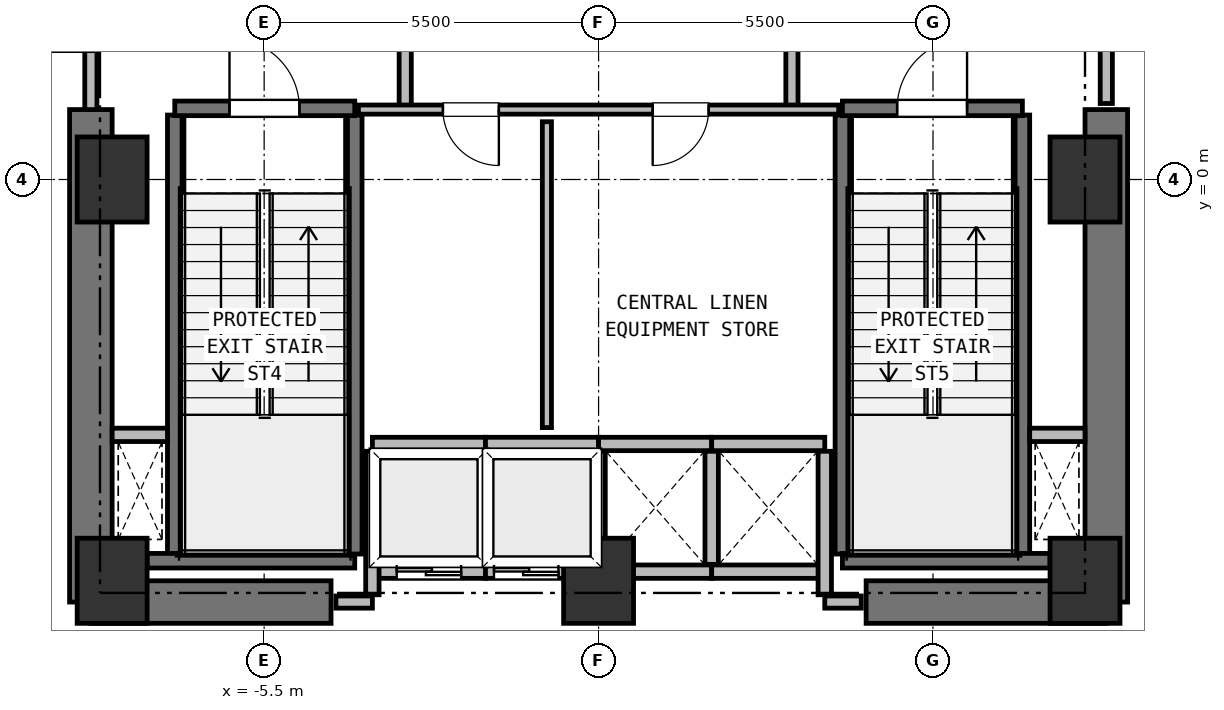
"""IFC4 building model, lengths in metres.
Left out: names, types, materials, properties, quantities, classifications, styles, units other than length and angle.
Written with IfcOpenShell. Run it as: python <this file> out.ifc"""

import sys

from ifc_helpers import new_model, si_unit, direction, frame, frame_2d, origin, origin_2d, place, context, subcontext, project, spatial, rectangle, extrude, element, fill, save


model = new_model("IFC4")
c1 = context("Model", 3, precision=1e-05, world=origin(), true_north=direction((0.0, 1.0)))
c2 = subcontext(c1, "Body", "Model", "MODEL_VIEW")
j1 = project(units=[si_unit("LENGTHUNIT", "METRE"), si_unit("PLANEANGLEUNIT", "RADIAN")], contexts=[c1])
p1 = place(None, origin())
s1 = spatial("IfcSite", under=j1, at=p1, CompositionType="ELEMENT")
p2 = place(p1, origin())
s2 = spatial("IfcBuilding", under=s1, at=p2, CompositionType="ELEMENT")
p3 = place(p2, frame((0.0, 0.0, 11.0)))
s3 = spatial("IfcBuildingStorey", under=s2, at=p3, CompositionType="ELEMENT", Elevation=11.0)
for number, where, z_axis, x_axis in (
    (1, (-8.0, -6.6, 0.0), (0.0, 0.0, 1.0), (1.0, 0.0, 0.0)),
    (2, (0.0, -6.6, 0.0), (0.0, 0.0, 1.0), (1.0, 0.0, 0.0)),
    (3, (8.0, -6.6, 0.0), (0.0, 0.0, 1.0), (1.0, 0.0, 0.0)),
    (4, (8.0, 0.0, 0.0), (0.0, 0.0, 1.0), (1.0, 0.0, 0.0)),
    (5, (-8.0, 0.0, 0.0), (0.0, 0.0, 1.0), (1.0, 0.0, 0.0)),
):
    element("IfcColumn", number, at=place(p3, frame(where, z_axis=z_axis, x_axis=x_axis)), inside=s3, PredefinedType="COLUMN", context=c2, shape_type="SweptSolid", body=[
        extrude(rectangle(XDim=1.15, YDim=1.4, at=origin_2d()), origin(), (0.0, 0.0, 1.0), 5.0),
    ])
for number, where, z_axis, x_axis in (
    (6, (-8.35, -6.95, 0.0), (0.0, 0.0, 1.0), (1.0, 0.0, 0.0)),
    (7, (4.4, -6.95, 0.0), (0.0, 0.0, 1.0), (1.0, 0.0, 0.0)),
):
    element("IfcWall", number, at=place(p3, frame(where, z_axis=z_axis, x_axis=x_axis)), inside=s3, PredefinedType="SHEAR", context=c2, shape_type="SweptSolid", body=[
        extrude(rectangle(XDim=3.95, YDim=0.7, at=frame_2d((1.975, 0.0))), origin(), (0.0, 0.0, 1.0), 4.66),
    ])
for number, where, z_axis, x_axis in (
    (8, (-8.35, -6.95, 0.0), (0.0, 0.0, 1.0), (0.0, 1.0, 0.0)),
    (9, (8.35, -6.95, 0.0), (0.0, 0.0, 1.0), (0.0, 1.0, 0.0)),
):
    element("IfcWall", number, at=place(p3, frame(where, z_axis=z_axis, x_axis=x_axis)), inside=s3, PredefinedType="SHEAR", context=c2, shape_type="SweptSolid", body=[
        extrude(rectangle(XDim=8.1, YDim=0.7, at=frame_2d((4.05, 0.0))), origin(), (0.0, 0.0, 1.0), 4.66),
    ])
p4 = place(p3, frame((-6.97, -6.16, 0.0), z_axis=(0.0, 0.0, 1.0), x_axis=(0.0, 1.0, 0.0)))
e10 = element("IfcWall", 10, at=p4, inside=s3, PredefinedType="SHEAR", context=c2, shape_type="SweptSolid", body=[
    extrude(rectangle(XDim=7.22, YDim=0.24, at=frame_2d((3.61, 0.0))), origin(), (0.0, 0.0, 1.0), 4.66),
])
p5 = place(p3, frame((-7.425, -6.27, 0.0), z_axis=(0.0, 0.0, 1.0), x_axis=(1.0, 0.0, 0.0)))
e11 = element("IfcWall", 11, at=p5, inside=s3, PredefinedType="SHEAR", context=c2, shape_type="SweptSolid", body=[
    extrude(rectangle(XDim=3.415, YDim=0.24, at=frame_2d((1.708, 0.0))), origin(), (0.0, 0.0, 1.0), 4.66),
])
p6 = place(p3, frame((-4.01, -6.16, 0.0), z_axis=(0.0, 0.0, 1.0), x_axis=(0.0, 1.0, 0.0)))
e12 = element("IfcWall", 12, at=p6, inside=s3, PredefinedType="SHEAR", context=c2, shape_type="SweptSolid", body=[
    extrude(rectangle(XDim=7.22, YDim=0.24, at=frame_2d((3.61, 0.0))), origin(), (0.0, 0.0, 1.0), 4.66),
])
p7 = place(p3, frame((-6.97, 1.17, 0.0), z_axis=(0.0, 0.0, 1.0), x_axis=(1.0, 0.0, 0.0)))
e13 = element("IfcWall", 13, at=p7, inside=s3, PredefinedType="SHEAR", context=c2, shape_type="SweptSolid", body=[
    extrude(rectangle(XDim=2.96, YDim=0.24, at=frame_2d((1.48, 0.0))), origin(), (0.0, 0.0, 1.0), 4.66),
])
p8 = place(p7, frame((0.9, 0.0, 0.0)))
e14 = element("IfcOpeningElement", 14, at=p8, cuts=e13, PredefinedType="OPENING", context=c2, shape_type="SweptSolid", body=[
    extrude(rectangle(XDim=1.15, YDim=2.15, at=frame_2d((0.575, 1.075))), frame((0.0, 0.13, 0.0), z_axis=(0.0, -1.0, 0.0), x_axis=(1.0, 0.0, 0.0)), (0.0, 0.0, 1.0), 0.26),
])
for number, where, z_axis, x_axis in (
    (15, (4.01, -6.16, 0.0), (0.0, 0.0, 1.0), (0.0, 1.0, 0.0)),
    (16, (6.97, -6.16, 0.0), (0.0, 0.0, 1.0), (0.0, 1.0, 0.0)),
):
    element("IfcWall", number, at=place(p3, frame(where, z_axis=z_axis, x_axis=x_axis)), inside=s3, PredefinedType="SHEAR", context=c2, shape_type="SweptSolid", body=[
        extrude(rectangle(XDim=7.22, YDim=0.24, at=frame_2d((3.61, 0.0))), origin(), (0.0, 0.0, 1.0), 4.66),
    ])
p9 = place(p3, frame((4.01, -6.27, 0.0), z_axis=(0.0, 0.0, 1.0), x_axis=(1.0, 0.0, 0.0)))
e17 = element("IfcWall", 17, at=p9, inside=s3, PredefinedType="SHEAR", context=c2, shape_type="SweptSolid", body=[
    extrude(rectangle(XDim=3.415, YDim=0.24, at=frame_2d((1.708, 0.0))), origin(), (0.0, 0.0, 1.0), 4.66),
])
p10 = place(p3, frame((4.01, 1.17, 0.0), z_axis=(0.0, 0.0, 1.0), x_axis=(1.0, 0.0, 0.0)))
e18 = element("IfcWall", 18, at=p10, inside=s3, PredefinedType="SHEAR", context=c2, shape_type="SweptSolid", body=[
    extrude(rectangle(XDim=2.96, YDim=0.24, at=frame_2d((1.48, 0.0))), origin(), (0.0, 0.0, 1.0), 4.66),
])
p11 = place(p10, frame((0.9, 0.0, 0.0)))
e19 = element("IfcOpeningElement", 19, at=p11, cuts=e18, PredefinedType="OPENING", context=c2, shape_type="SweptSolid", body=[
    extrude(rectangle(XDim=1.15, YDim=2.15, at=frame_2d((0.575, 1.075))), frame((0.0, 0.13, 0.0), z_axis=(0.0, -1.0, 0.0), x_axis=(1.0, 0.0, 0.0)), (0.0, 0.0, 1.0), 0.26),
])
for number, where, z_axis, x_axis in (
    (20, (-8.0, -4.2, 0.0), (0.0, 0.0, 1.0), (1.0, 0.0, 0.0)),
    (21, (7.09, -4.2, 0.0), (0.0, 0.0, 1.0), (1.0, 0.0, 0.0)),
):
    element("IfcWall", number, at=place(p3, frame(where, z_axis=z_axis, x_axis=x_axis)), inside=s3, PredefinedType="PARTITIONING", context=c2, shape_type="SweptSolid", body=[
        extrude(rectangle(XDim=0.91, YDim=0.22, at=frame_2d((0.455, 0.0))), origin(), (0.0, 0.0, 1.0), 4.66),
    ])
p12 = place(p3, frame((-3.72, -6.45, 0.0), z_axis=(0.0, 0.0, 1.0), x_axis=(1.0, 0.0, 0.0)))
e22 = element("IfcWall", 22, at=p12, inside=s3, PredefinedType="PARTITIONING", context=c2, shape_type="SweptSolid", body=[
    extrude(rectangle(XDim=1.86, YDim=0.22, at=frame_2d((0.93, 0.0))), origin(), (0.0, 0.0, 1.0), 4.24),
])
p13 = place(p12, frame((0.4, 0.0, 0.0)))
e23 = element("IfcOpeningElement", 23, at=p13, cuts=e22, PredefinedType="OPENING", context=c2, shape_type="SweptSolid", body=[
    extrude(rectangle(XDim=1.06, YDim=2.15, at=frame_2d((0.53, 1.075))), frame((0.0, 0.12, 0.0), z_axis=(0.0, -1.0, 0.0), x_axis=(1.0, 0.0, 0.0)), (0.0, 0.0, 1.0), 0.24),
])
p14 = place(p3, frame((-3.72, -4.35, 0.0), z_axis=(0.0, 0.0, 1.0), x_axis=(1.0, 0.0, 0.0)))
e24 = element("IfcWall", 24, at=p14, inside=s3, PredefinedType="PARTITIONING", context=c2, shape_type="SweptSolid", body=[
    extrude(rectangle(XDim=1.86, YDim=0.22, at=frame_2d((0.93, 0.0))), origin(), (0.0, 0.0, 1.0), 4.66),
])
p15 = place(p3, frame((-3.72, -6.83, 0.0), z_axis=(0.0, 0.0, 1.0), x_axis=(0.0, 1.0, 0.0)))
e25 = element("IfcWall", 25, at=p15, inside=s3, PredefinedType="PARTITIONING", context=c2, shape_type="SweptSolid", body=[
    extrude(rectangle(XDim=2.36, YDim=0.22, at=frame_2d((1.18, 0.0))), origin(), (0.0, 0.0, 1.0), 4.66),
])
p16 = place(p3, frame((-1.86, -6.33, 0.0), z_axis=(0.0, 0.0, 1.0), x_axis=(0.0, 1.0, 0.0)))
e26 = element("IfcWall", 26, at=p16, inside=s3, PredefinedType="PARTITIONING", context=c2, shape_type="SweptSolid", body=[
    extrude(rectangle(XDim=1.86, YDim=0.22, at=frame_2d((0.93, 0.0))), origin(), (0.0, 0.0, 1.0), 4.66),
])
p17 = place(p3, frame((-1.86, -6.45, 0.0), z_axis=(0.0, 0.0, 1.0), x_axis=(1.0, 0.0, 0.0)))
e27 = element("IfcWall", 27, at=p17, inside=s3, PredefinedType="PARTITIONING", context=c2, shape_type="SweptSolid", body=[
    extrude(rectangle(XDim=1.86, YDim=0.22, at=frame_2d((0.93, 0.0))), origin(), (0.0, 0.0, 1.0), 4.24),
])
p18 = place(p17, frame((0.14, 0.0, 0.0)))
e28 = element("IfcOpeningElement", 28, at=p18, cuts=e27, PredefinedType="OPENING", context=c2, shape_type="SweptSolid", body=[
    extrude(rectangle(XDim=1.06, YDim=2.15, at=frame_2d((0.53, 1.075))), frame((0.0, 0.12, 0.0), z_axis=(0.0, -1.0, 0.0), x_axis=(1.0, 0.0, 0.0)), (0.0, 0.0, 1.0), 0.24),
])
for number, where, z_axis, x_axis in (
    (29, (-1.86, -4.35, 0.0), (0.0, 0.0, 1.0), (1.0, 0.0, 0.0)),
    (30, (0.0, -6.33, 0.0), (0.0, 0.0, 1.0), (0.0, 1.0, 0.0)),
):
    element("IfcWall", number, at=place(p3, frame(where, z_axis=z_axis, x_axis=x_axis)), inside=s3, PredefinedType="PARTITIONING", context=c2, shape_type="SweptSolid", body=[
        extrude(rectangle(XDim=1.86, YDim=0.22, at=frame_2d((0.93, 0.0))), origin(), (0.0, 0.0, 1.0), 4.66),
    ])
p19 = place(p3, frame((0.0, -6.45, 0.0), z_axis=(0.0, 0.0, 1.0), x_axis=(1.0, 0.0, 0.0)))
e31 = element("IfcWall", 31, at=p19, inside=s3, PredefinedType="PARTITIONING", context=c2, shape_type="SweptSolid", body=[
    extrude(rectangle(XDim=1.86, YDim=0.22, at=frame_2d((0.93, 0.0))), origin(), (0.0, 0.0, 1.0), 4.24),
])
for number, where, z_axis, x_axis in (
    (32, (0.0, -4.35, 0.0), (0.0, 0.0, 1.0), (1.0, 0.0, 0.0)),
    (33, (1.86, -6.33, 0.0), (0.0, 0.0, 1.0), (0.0, 1.0, 0.0)),
):
    element("IfcWall", number, at=place(p3, frame(where, z_axis=z_axis, x_axis=x_axis)), inside=s3, PredefinedType="PARTITIONING", context=c2, shape_type="SweptSolid", body=[
        extrude(rectangle(XDim=1.86, YDim=0.22, at=frame_2d((0.93, 0.0))), origin(), (0.0, 0.0, 1.0), 4.66),
    ])
p20 = place(p3, frame((1.86, -6.45, 0.0), z_axis=(0.0, 0.0, 1.0), x_axis=(1.0, 0.0, 0.0)))
e34 = element("IfcWall", 34, at=p20, inside=s3, PredefinedType="PARTITIONING", context=c2, shape_type="SweptSolid", body=[
    extrude(rectangle(XDim=1.86, YDim=0.22, at=frame_2d((0.93, 0.0))), origin(), (0.0, 0.0, 1.0), 4.24),
])
p21 = place(p3, frame((1.86, -4.35, 0.0), z_axis=(0.0, 0.0, 1.0), x_axis=(1.0, 0.0, 0.0)))
e35 = element("IfcWall", 35, at=p21, inside=s3, PredefinedType="PARTITIONING", context=c2, shape_type="SweptSolid", body=[
    extrude(rectangle(XDim=1.86, YDim=0.22, at=frame_2d((0.93, 0.0))), origin(), (0.0, 0.0, 1.0), 4.66),
])
p22 = place(p3, frame((3.72, -6.83, 0.0), z_axis=(0.0, 0.0, 1.0), x_axis=(0.0, 1.0, 0.0)))
e36 = element("IfcWall", 36, at=p22, inside=s3, PredefinedType="PARTITIONING", context=c2, shape_type="SweptSolid", body=[
    extrude(rectangle(XDim=2.36, YDim=0.22, at=frame_2d((1.18, 0.0))), origin(), (0.0, 0.0, 1.0), 4.66),
])
p23 = place(p3, frame((-3.18, 1.15, 0.0), z_axis=(0.0, 0.0, 1.0), x_axis=(0.0, 1.0, 0.0)))
e37 = element("IfcWall", 37, at=p23, inside=s3, PredefinedType="PARTITIONING", context=c2, shape_type="SweptSolid", body=[
    extrude(rectangle(XDim=3.3, YDim=0.2, at=frame_2d((1.65, 0.0))), origin(), (0.0, 0.0, 1.0), 4.66),
])
p24 = place(p23, frame((1.08, 0.0, 0.0)))
e38 = element("IfcOpeningElement", 38, at=p24, cuts=e37, PredefinedType="OPENING", context=c2, shape_type="SweptSolid", body=[
    extrude(rectangle(XDim=1.15, YDim=2.15, at=frame_2d((0.575, 1.075))), frame((0.0, 0.11, 0.0), z_axis=(0.0, -1.0, 0.0), x_axis=(1.0, 0.0, 0.0)), (0.0, 0.0, 1.0), 0.22),
])
p25 = place(p3, frame((3.18, 1.15, 0.0), z_axis=(0.0, 0.0, 1.0), x_axis=(0.0, 1.0, 0.0)))
e39 = element("IfcWall", 39, at=p25, inside=s3, PredefinedType="PARTITIONING", context=c2, shape_type="SweptSolid", body=[
    extrude(rectangle(XDim=3.3, YDim=0.2, at=frame_2d((1.65, 0.0))), origin(), (0.0, 0.0, 1.0), 4.66),
])
p26 = place(p25, frame((1.08, 0.0, 0.0)))
e40 = element("IfcOpeningElement", 40, at=p26, cuts=e39, PredefinedType="OPENING", context=c2, shape_type="SweptSolid", body=[
    extrude(rectangle(XDim=1.15, YDim=2.15, at=frame_2d((0.575, 1.075))), frame((0.0, 0.11, 0.0), z_axis=(0.0, -1.0, 0.0), x_axis=(1.0, 0.0, 0.0)), (0.0, 0.0, 1.0), 0.22),
])
p27 = place(p3, frame((-8.35, 1.15, 0.0), z_axis=(0.0, 0.0, 1.0), x_axis=(0.0, 1.0, 0.0)))
e41 = element("IfcWall", 41, at=p27, inside=s3, PredefinedType="PARTITIONING", context=c2, shape_type="SweptSolid", body=[
    extrude(rectangle(XDim=5.4, YDim=0.2, at=frame_2d((2.7, 0.0))), origin(), (0.0, 0.0, 1.0), 4.66),
])
p28 = place(p27, frame((0.95, 0.0, 0.0)))
e42 = element("IfcOpeningElement", 42, at=p28, cuts=e41, PredefinedType="OPENING", context=c2, shape_type="SweptSolid", body=[
    extrude(rectangle(XDim=1.15, YDim=2.15, at=frame_2d((0.575, 1.075))), frame((0.0, 0.11, 0.0), z_axis=(0.0, -1.0, 0.0), x_axis=(1.0, 0.0, 0.0)), (0.0, 0.0, 1.0), 0.22),
])
p29 = place(p3, frame((8.35, 1.25, 0.0), z_axis=(0.0, 0.0, 1.0), x_axis=(0.0, 1.0, 0.0)))
e43 = element("IfcWall", 43, at=p29, inside=s3, PredefinedType="PARTITIONING", context=c2, shape_type="SweptSolid", body=[
    extrude(rectangle(XDim=5.3, YDim=0.2, at=frame_2d((2.65, 0.0))), origin(), (0.0, 0.0, 1.0), 4.66),
])
p30 = place(p29, frame((0.95, 0.0, 0.0)))
e44 = element("IfcOpeningElement", 44, at=p30, cuts=e43, PredefinedType="OPENING", context=c2, shape_type="SweptSolid", body=[
    extrude(rectangle(XDim=1.15, YDim=2.15, at=frame_2d((0.575, 1.075))), frame((0.0, 0.11, 0.0), z_axis=(0.0, -1.0, 0.0), x_axis=(1.0, 0.0, 0.0)), (0.0, 0.0, 1.0), 0.22),
])
p31 = place(p3, frame((3.95, 1.15, 0.0), z_axis=(0.0, 0.0, 1.0), x_axis=(-1.0, 0.0, 0.0)))
e45 = element("IfcWall", 45, at=p31, inside=s3, PredefinedType="PARTITIONING", context=c2, shape_type="SweptSolid", body=[
    extrude(rectangle(XDim=7.9, YDim=0.15, at=frame_2d((3.95, 0.0))), origin(), (0.0, 0.0, 1.0), 4.66),
])
p32 = place(p31, frame((5.59, 0.0, 0.0)))
e46 = element("IfcOpeningElement", 46, at=p32, cuts=e45, PredefinedType="OPENING", context=c2, shape_type="SweptSolid", body=[
    extrude(rectangle(XDim=0.92, YDim=2.05, at=frame_2d((0.46, 1.025))), frame((0.0, 0.085, 0.0), z_axis=(0.0, -1.0, 0.0), x_axis=(1.0, 0.0, 0.0)), (0.0, 0.0, 1.0), 0.17),
])
p33 = place(p31, frame((2.14, 0.0, 0.0)))
e47 = element("IfcOpeningElement", 47, at=p33, cuts=e45, PredefinedType="OPENING", context=c2, shape_type="SweptSolid", body=[
    extrude(rectangle(XDim=0.92, YDim=2.05, at=frame_2d((0.46, 1.025))), frame((0.0, 0.085, 0.0), z_axis=(0.0, -1.0, 0.0), x_axis=(1.0, 0.0, 0.0)), (0.0, 0.0, 1.0), 0.17),
])
for number, where, z_axis, x_axis in (
    (48, (-4.32, -6.95, 0.0), (0.0, 0.0, 1.0), (1.0, 0.0, 0.0)),
    (49, (3.72, -6.95, 0.0), (0.0, 0.0, 1.0), (1.0, 0.0, 0.0)),
):
    element("IfcWall", number, at=place(p3, frame(where, z_axis=z_axis, x_axis=x_axis)), inside=s3, PredefinedType="PARTITIONING", context=c2, shape_type="SweptSolid", body=[
        extrude(rectangle(XDim=0.6, YDim=0.2, at=frame_2d((0.3, 0.0))), origin(), (0.0, 0.0, 1.0), 4.66),
    ])
p34 = place(p3, frame((-0.85, -4.08, 0.0), z_axis=(0.0, 0.0, 1.0), x_axis=(0.0, 1.0, 0.0)))
e50 = element("IfcWall", 50, at=p34, inside=s3, PredefinedType="PARTITIONING", context=c2, shape_type="SweptSolid", body=[
    extrude(rectangle(XDim=5.03, YDim=0.15, at=frame_2d((2.515, 0.0))), origin(), (0.0, 0.0, 1.0), 4.66),
])
p35 = place(p8, origin())
e51 = element("IfcDoor", 51, at=p35, inside=s3, OperationType="SINGLE_SWING_LEFT", PredefinedType="DOOR", context=c2, shape_type="SweptSolid", body=[
    extrude(rectangle(XDim=1.15, YDim=2.15, at=frame_2d((0.575, 1.075))), frame((0.0, 0.025, 0.0), z_axis=(0.0, -1.0, 0.0), x_axis=(1.0, 0.0, 0.0)), (0.0, 0.0, 1.0), 0.05),
])
fill(e14, e51)
p36 = place(p11, origin())
e52 = element("IfcDoor", 52, at=p36, inside=s3, OperationType="SINGLE_SWING_RIGHT", PredefinedType="DOOR", context=c2, shape_type="SweptSolid", body=[
    extrude(rectangle(XDim=1.15, YDim=2.15, at=frame_2d((0.575, 1.075))), frame((0.0, 0.025, 0.0), z_axis=(0.0, -1.0, 0.0), x_axis=(1.0, 0.0, 0.0)), (0.0, 0.0, 1.0), 0.05),
])
fill(e19, e52)
p37 = place(p13, origin())
e53 = element("IfcDoor", 53, at=p37, inside=s3, OperationType="DOUBLE_DOOR_SLIDING", PredefinedType="DOOR", context=c2, shape_type="SweptSolid", body=[
    extrude(rectangle(XDim=1.06, YDim=2.15, at=frame_2d((0.53, 1.075))), frame((0.0, 0.025, 0.0), z_axis=(0.0, -1.0, 0.0), x_axis=(1.0, 0.0, 0.0)), (0.0, 0.0, 1.0), 0.05),
])
fill(e23, e53)
p38 = place(p18, origin())
e54 = element("IfcDoor", 54, at=p38, inside=s3, OperationType="DOUBLE_DOOR_SLIDING", PredefinedType="DOOR", context=c2, shape_type="SweptSolid", body=[
    extrude(rectangle(XDim=1.06, YDim=2.15, at=frame_2d((0.53, 1.075))), frame((0.0, 0.025, 0.0), z_axis=(0.0, -1.0, 0.0), x_axis=(1.0, 0.0, 0.0)), (0.0, 0.0, 1.0), 0.05),
])
fill(e28, e54)
p39 = place(p28, origin())
e55 = element("IfcDoor", 55, at=p39, inside=s3, OperationType="SINGLE_SWING_LEFT", PredefinedType="DOOR", context=c2, shape_type="SweptSolid", body=[
    extrude(rectangle(XDim=1.15, YDim=2.15, at=frame_2d((0.575, 1.075))), frame((0.0, 0.025, 0.0), z_axis=(0.0, -1.0, 0.0), x_axis=(1.0, 0.0, 0.0)), (0.0, 0.0, 1.0), 0.05),
])
fill(e42, e55)
p40 = place(p32, origin())
e56 = element("IfcDoor", 56, at=p40, inside=s3, OperationType="SINGLE_SWING_LEFT", PredefinedType="DOOR", context=c2, shape_type="SweptSolid", body=[
    extrude(rectangle(XDim=0.92, YDim=2.05, at=frame_2d((0.46, 1.025))), frame((0.0, 0.025, 0.0), z_axis=(0.0, -1.0, 0.0), x_axis=(1.0, 0.0, 0.0)), (0.0, 0.0, 1.0), 0.05),
])
fill(e46, e56)
p41 = place(p33, origin())
e57 = element("IfcDoor", 57, at=p41, inside=s3, OperationType="SINGLE_SWING_RIGHT", PredefinedType="DOOR", context=c2, shape_type="SweptSolid", body=[
    extrude(rectangle(XDim=0.92, YDim=2.05, at=frame_2d((0.46, 1.025))), frame((0.0, 0.025, 0.0), z_axis=(0.0, -1.0, 0.0), x_axis=(1.0, 0.0, 0.0)), (0.0, 0.0, 1.0), 0.05),
])
fill(e47, e57)
save(model, sys.argv[1])
